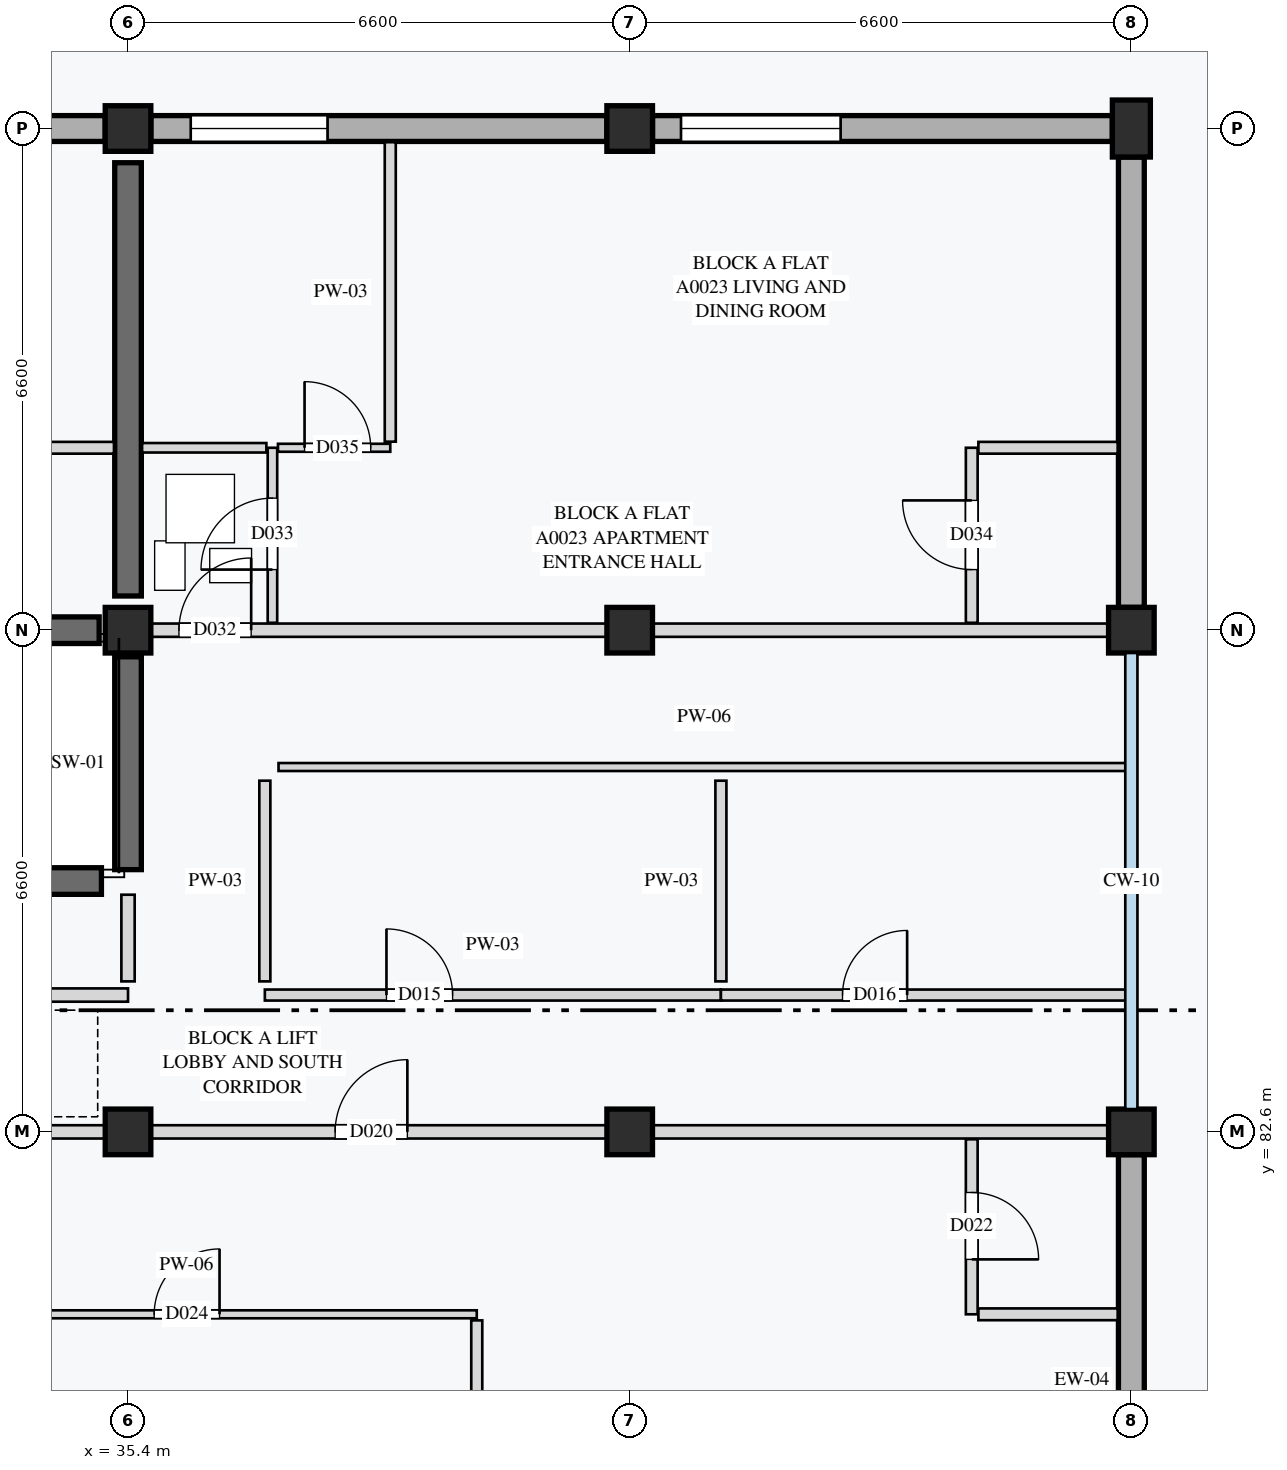
"""IFC4 building model, lengths in metres.
Left out: names, types, materials, properties, quantities, classifications, styles, units other than length and angle.
Written with IfcOpenShell. Run it as: python <this file> out.ifc"""

import sys

from ifc_helpers import new_model, si_unit, direction, frame, frame_2d, origin, origin_2d, place, context, subcontext, project, spatial, rectangle, extrude, element, fill, save


model = new_model("IFC4")
c1 = context("Model", 3, precision=1e-05, world=origin(), true_north=direction((0.0, 1.0)))
c2 = subcontext(c1, "Body", "Model", "MODEL_VIEW")
j1 = project(units=[si_unit("LENGTHUNIT", "METRE"), si_unit("PLANEANGLEUNIT", "RADIAN")], contexts=[c1])
p1 = place(None, origin())
s1 = spatial("IfcSite", under=j1, at=p1, CompositionType="ELEMENT")
p2 = place(p1, origin())
s2 = spatial("IfcBuilding", under=s1, at=p2, CompositionType="ELEMENT")
p3 = place(p2, origin())
s3 = spatial("IfcBuildingStorey", under=s2, at=p3, CompositionType="ELEMENT", Elevation=0.0)
for number, where, z_axis, x_axis in (
    (1, (35.4, 82.6, 0.0), (0.0, 0.0, 1.0), (1.0, 0.0, 0.0)),
    (2, (35.4, 89.2, 0.0), (0.0, 0.0, 1.0), (1.0, 0.0, 0.0)),
    (3, (35.4, 95.8, 0.0), (0.0, 0.0, 1.0), (1.0, 0.0, 0.0)),
    (4, (42.0, 82.6, 0.0), (0.0, 0.0, 1.0), (1.0, 0.0, 0.0)),
    (5, (42.0, 89.2, 0.0), (0.0, 0.0, 1.0), (1.0, 0.0, 0.0)),
    (6, (42.0, 95.8, 0.0), (0.0, 0.0, 1.0), (1.0, 0.0, 0.0)),
    (7, (48.6, 82.6, 0.0), (0.0, 0.0, 1.0), (1.0, 0.0, 0.0)),
    (8, (48.6, 89.2, 0.0), (0.0, 0.0, 1.0), (1.0, 0.0, 0.0)),
):
    element("IfcColumn", number, at=place(p3, frame(where, z_axis=z_axis, x_axis=x_axis)), inside=s3, PredefinedType="COLUMN", context=c2, shape_type="SweptSolid", body=[
        extrude(rectangle(XDim=0.6, YDim=0.6, at=origin_2d()), origin(), (0.0, 0.0, 1.0), 4.2),
    ])
p4 = place(p3, frame((48.6, 95.8, 0.0), z_axis=(0.0, 0.0, 1.0), x_axis=(1.0, 0.0, 0.0)))
e9 = element("IfcColumn", 9, at=p4, inside=s3, PredefinedType="COLUMN", context=c2, shape_type="SweptSolid", body=[
    extrude(rectangle(XDim=0.5, YDim=0.75, at=origin_2d()), origin(), (0.0, 0.0, 1.0), 4.2),
])
p5 = place(p3, frame((29.18, 89.2, 0.0), z_axis=(0.0, 0.0, 1.0), x_axis=(1.0, 0.0, 0.0)))
e10 = element("IfcWall", 10, at=p5, inside=s3, PredefinedType="SHEAR", context=c2, shape_type="SweptSolid", body=[
    extrude(rectangle(XDim=5.84, YDim=0.35, at=frame_2d((2.92, 0.0))), origin(), (0.0, 0.0, 1.0), 3.92),
])
for number, where, z_axis, x_axis in (
    (11, (32.25, 85.9, 0.0), (0.0, 0.0, 1.0), (1.0, 0.0, 0.0)),
    (12, (35.4, 86.05, 0.0), (0.0, 0.0, 1.0), (0.0, 1.0, 0.0)),
):
    element("IfcWall", number, at=place(p3, frame(where, z_axis=z_axis, x_axis=x_axis)), inside=s3, PredefinedType="SHEAR", context=c2, shape_type="SweptSolid", body=[
        extrude(rectangle(XDim=2.8, YDim=0.35, at=frame_2d((1.4, 0.0))), origin(), (0.0, 0.0, 1.0), 3.92),
    ])
p6 = place(p3, frame((35.4, 89.65, 0.0), z_axis=(0.0, 0.0, 1.0), x_axis=(0.0, 1.0, 0.0)))
e13 = element("IfcWall", 13, at=p6, inside=s3, PredefinedType="SHEAR", context=c2, shape_type="SweptSolid", body=[
    extrude(rectangle(XDim=5.7, YDim=0.35, at=frame_2d((2.85, 0.0))), origin(), (0.0, 0.0, 1.0), 3.92),
])
p7 = place(p3, frame((29.1, 95.8, 0.0), z_axis=(0.0, 0.0, 1.0), x_axis=(1.0, 0.0, 0.0)))
e14 = element("IfcWall", 14, at=p7, inside=s3, PredefinedType="STANDARD", context=c2, shape_type="SweptSolid", body=[
    extrude(rectangle(XDim=6.0, YDim=0.34, at=frame_2d((3.0, 0.0))), origin(), (0.0, 0.0, 1.0), 3.6),
])
p8 = place(p7, frame((2.396, 0.0, 0.85)))
e15 = element("IfcOpeningElement", 15, at=p8, cuts=e14, PredefinedType="OPENING", context=c2, shape_type="SweptSolid", body=[
    extrude(rectangle(XDim=2.1, YDim=1.55, at=frame_2d((1.05, 0.775))), frame((0.0, 0.18, 0.0), z_axis=(0.0, -1.0, 0.0), x_axis=(1.0, 0.0, 0.0)), (0.0, 0.0, 1.0), 0.36),
])
p9 = place(p3, frame((35.7, 95.8, 0.0), z_axis=(0.0, 0.0, 1.0), x_axis=(1.0, 0.0, 0.0)))
e16 = element("IfcWall", 16, at=p9, inside=s3, PredefinedType="STANDARD", context=c2, shape_type="SweptSolid", body=[
    extrude(rectangle(XDim=6.0, YDim=0.34, at=frame_2d((3.0, 0.0))), origin(), (0.0, 0.0, 1.0), 3.6),
])
p10 = place(p9, frame((0.525, 0.0, 0.85)))
e17 = element("IfcOpeningElement", 17, at=p10, cuts=e16, PredefinedType="OPENING", context=c2, shape_type="SweptSolid", body=[
    extrude(rectangle(XDim=1.8, YDim=1.35, at=frame_2d((0.9, 0.675))), frame((0.0, 0.18, 0.0), z_axis=(0.0, -1.0, 0.0), x_axis=(1.0, 0.0, 0.0)), (0.0, 0.0, 1.0), 0.36),
])
p11 = place(p3, frame((42.3, 95.8, 0.0), z_axis=(0.0, 0.0, 1.0), x_axis=(1.0, 0.0, 0.0)))
e18 = element("IfcWall", 18, at=p11, inside=s3, PredefinedType="STANDARD", context=c2, shape_type="SweptSolid", body=[
    extrude(rectangle(XDim=6.05, YDim=0.34, at=frame_2d((3.025, 0.0))), origin(), (0.0, 0.0, 1.0), 3.6),
])
p12 = place(p11, frame((0.375, 0.0, 0.85)))
e19 = element("IfcOpeningElement", 19, at=p12, cuts=e18, PredefinedType="OPENING", context=c2, shape_type="SweptSolid", body=[
    extrude(rectangle(XDim=2.1, YDim=1.55, at=frame_2d((1.05, 0.775))), frame((0.0, 0.18, 0.0), z_axis=(0.0, -1.0, 0.0), x_axis=(1.0, 0.0, 0.0)), (0.0, 0.0, 1.0), 0.36),
])
for number, where, z_axis, x_axis in (
    (20, (48.6, 76.375, 0.0), (0.0, 0.0, 1.0), (0.0, 1.0, 0.0)),
    (21, (48.6, 89.5, 0.0), (0.0, 0.0, 1.0), (0.0, 1.0, 0.0)),
):
    element("IfcWall", number, at=place(p3, frame(where, z_axis=z_axis, x_axis=x_axis)), inside=s3, PredefinedType="STANDARD", context=c2, shape_type="SweptSolid", body=[
        extrude(rectangle(XDim=5.925, YDim=0.34, at=frame_2d((2.962, 0.0))), origin(), (0.0, 0.0, 1.0), 3.65),
    ])
p13 = place(p3, frame((32.1, 84.4, 0.0), z_axis=(0.0, 0.0, 1.0), x_axis=(1.0, 0.0, 0.0)))
e22 = element("IfcWall", 22, at=p13, inside=s3, PredefinedType="PARTITIONING", context=c2, shape_type="SweptSolid", body=[
    extrude(rectangle(XDim=3.3, YDim=0.175, at=frame_2d((1.65, 0.0))), origin(), (0.0, 0.0, 1.0), 3.92),
])
p14 = place(p13, frame((1.1, 0.0, 0.0)))
e23 = element("IfcOpeningElement", 23, at=p14, cuts=e22, PredefinedType="OPENING", context=c2, shape_type="SweptSolid", body=[
    extrude(rectangle(XDim=0.85, YDim=2.0, at=frame_2d((0.425, 1.0))), frame((0.0, 0.097, 0.0), z_axis=(0.0, -1.0, 0.0), x_axis=(1.0, 0.0, 0.0)), (0.0, 0.0, 1.0), 0.195),
])
p15 = place(p3, frame((35.4, 84.58, 0.0), z_axis=(0.0, 0.0, 1.0), x_axis=(0.0, 1.0, 0.0)))
e24 = element("IfcWall", 24, at=p15, inside=s3, PredefinedType="PARTITIONING", context=c2, shape_type="SweptSolid", body=[
    extrude(rectangle(XDim=1.14, YDim=0.175, at=frame_2d((0.57, 0.0))), origin(), (0.0, 0.0, 1.0), 3.92),
])
p16 = place(p3, frame((37.2, 84.4, 0.0), z_axis=(0.0, 0.0, 1.0), x_axis=(1.0, 0.0, 0.0)))
e25 = element("IfcWall", 25, at=p16, inside=s3, PredefinedType="PARTITIONING", context=c2, shape_type="SweptSolid", body=[
    extrude(rectangle(XDim=6.0, YDim=0.145, at=frame_2d((3.0, 0.0))), origin(), (0.0, 0.0, 1.0), 3.92),
])
p17 = place(p16, frame((1.6, 0.0, 0.0)))
e26 = element("IfcOpeningElement", 26, at=p17, cuts=e25, PredefinedType="OPENING", context=c2, shape_type="SweptSolid", body=[
    extrude(rectangle(XDim=0.87, YDim=2.08, at=frame_2d((0.435, 1.04))), frame((0.0, 0.083, 0.0), z_axis=(0.0, -1.0, 0.0), x_axis=(1.0, 0.0, 0.0)), (0.0, 0.0, 1.0), 0.165),
])
p18 = place(p3, frame((43.2, 84.4, 0.0), z_axis=(0.0, 0.0, 1.0), x_axis=(1.0, 0.0, 0.0)))
e27 = element("IfcWall", 27, at=p18, inside=s3, PredefinedType="PARTITIONING", context=c2, shape_type="SweptSolid", body=[
    extrude(rectangle(XDim=5.4, YDim=0.145, at=frame_2d((2.7, 0.0))), origin(), (0.0, 0.0, 1.0), 3.92),
])
p19 = place(p18, frame((1.6, 0.0, 0.0)))
e28 = element("IfcOpeningElement", 28, at=p19, cuts=e27, PredefinedType="OPENING", context=c2, shape_type="SweptSolid", body=[
    extrude(rectangle(XDim=0.85, YDim=2.1, at=frame_2d((0.425, 1.05))), frame((0.0, 0.083, 0.0), z_axis=(0.0, -1.0, 0.0), x_axis=(1.0, 0.0, 0.0)), (0.0, 0.0, 1.0), 0.165),
])
p20 = place(p3, frame((43.2, 84.58, 0.0), z_axis=(0.0, 0.0, 1.0), x_axis=(0.0, 1.0, 0.0)))
e29 = element("IfcWall", 29, at=p20, inside=s3, PredefinedType="PARTITIONING", context=c2, shape_type="SweptSolid", body=[
    extrude(rectangle(XDim=2.64, YDim=0.145, at=frame_2d((1.32, 0.0))), origin(), (0.0, 0.0, 1.0), 3.92),
])
p21 = place(p3, frame((37.38, 87.4, 0.0), z_axis=(0.0, 0.0, 1.0), x_axis=(1.0, 0.0, 0.0)))
e30 = element("IfcWall", 30, at=p21, inside=s3, PredefinedType="PARTITIONING", context=c2, shape_type="SweptSolid", body=[
    extrude(rectangle(XDim=11.2, YDim=0.105, at=frame_2d((5.6, 0.0))), origin(), (0.0, 0.0, 1.0), 3.92),
])
p22 = place(p3, frame((37.2, 84.58, 0.0), z_axis=(0.0, 0.0, 1.0), x_axis=(0.0, 1.0, 0.0)))
e31 = element("IfcWall", 31, at=p22, inside=s3, PredefinedType="PARTITIONING", context=c2, shape_type="SweptSolid", body=[
    extrude(rectangle(XDim=2.64, YDim=0.145, at=frame_2d((1.32, 0.0))), origin(), (0.0, 0.0, 1.0), 3.92),
])
p23 = place(p3, frame((28.8, 82.6, 0.0), z_axis=(0.0, 0.0, 1.0), x_axis=(1.0, 0.0, 0.0)))
e32 = element("IfcWall", 32, at=p23, inside=s3, PredefinedType="PARTITIONING", context=c2, shape_type="SweptSolid", body=[
    extrude(rectangle(XDim=19.8, YDim=0.175, at=frame_2d((9.9, 0.0))), origin(), (0.0, 0.0, 1.0), 3.55),
])
p24 = place(p23, frame((9.325, 0.0, 0.0)))
e33 = element("IfcOpeningElement", 33, at=p24, cuts=e32, PredefinedType="OPENING", context=c2, shape_type="SweptSolid", body=[
    extrude(rectangle(XDim=0.95, YDim=2.1, at=frame_2d((0.475, 1.05))), frame((0.0, 0.097, 0.0), z_axis=(0.0, -1.0, 0.0), x_axis=(1.0, 0.0, 0.0)), (0.0, 0.0, 1.0), 0.195),
])
p25 = place(p3, frame((46.5, 82.502, 0.0), z_axis=(0.0, 0.0, 1.0), x_axis=(0.0, -1.0, 0.0)))
e34 = element("IfcWall", 34, at=p25, inside=s3, PredefinedType="PARTITIONING", context=c2, shape_type="SweptSolid", body=[
    extrude(rectangle(XDim=2.302, YDim=0.155, at=frame_2d((1.151, 0.0))), origin(), (0.0, 0.0, 1.0), 3.92),
])
p26 = place(p25, frame((0.7, 0.0, 0.0)))
e35 = element("IfcOpeningElement", 35, at=p26, cuts=e34, PredefinedType="OPENING", context=c2, shape_type="SweptSolid", body=[
    extrude(rectangle(XDim=0.88, YDim=2.1, at=frame_2d((0.44, 1.05))), frame((0.0, 0.087, 0.0), z_axis=(0.0, -1.0, 0.0), x_axis=(1.0, 0.0, 0.0)), (0.0, 0.0, 1.0), 0.175),
])
p27 = place(p3, frame((46.587, 80.2, 0.0), z_axis=(0.0, 0.0, 1.0), x_axis=(1.0, 0.0, 0.0)))
e36 = element("IfcWall", 36, at=p27, inside=s3, PredefinedType="PARTITIONING", context=c2, shape_type="SweptSolid", body=[
    extrude(rectangle(XDim=1.833, YDim=0.155, at=frame_2d((0.916, 0.0))), origin(), (0.0, 0.0, 1.0), 3.92),
])
p28 = place(p3, frame((32.35, 80.2, 0.0), z_axis=(0.0, 0.0, 1.0), x_axis=(1.0, 0.0, 0.0)))
e37 = element("IfcWall", 37, at=p28, inside=s3, PredefinedType="PARTITIONING", context=c2, shape_type="SweptSolid", body=[
    extrude(rectangle(XDim=7.638, YDim=0.105, at=frame_2d((3.819, 0.0))), origin(), (0.0, 0.0, 1.0), 3.92),
])
p29 = place(p28, frame((3.394, 0.0, 0.0)))
e38 = element("IfcOpeningElement", 38, at=p29, cuts=e37, PredefinedType="OPENING", context=c2, shape_type="SweptSolid", body=[
    extrude(rectangle(XDim=0.86, YDim=2.12, at=frame_2d((0.43, 1.06))), frame((0.0, 0.062, 0.0), z_axis=(0.0, -1.0, 0.0), x_axis=(1.0, 0.0, 0.0)), (0.0, 0.0, 1.0), 0.125),
])
p30 = place(p3, frame((39.988, 80.12, 0.0), z_axis=(0.0, 0.0, 1.0), x_axis=(0.0, -1.0, 0.0)))
e39 = element("IfcWall", 39, at=p30, inside=s3, PredefinedType="PARTITIONING", context=c2, shape_type="SweptSolid", body=[
    extrude(rectangle(XDim=3.94, YDim=0.145, at=frame_2d((1.97, 0.0))), origin(), (0.0, 0.0, 1.0), 3.92),
])
p31 = place(p3, frame((33.387, 91.6, 0.0), z_axis=(0.0, 0.0, 1.0), x_axis=(1.0, 0.0, 0.0)))
e40 = element("IfcWall", 40, at=p31, inside=s3, PredefinedType="PARTITIONING", context=c2, shape_type="SweptSolid", body=[
    extrude(rectangle(XDim=1.828, YDim=0.155, at=frame_2d((0.914, 0.0))), origin(), (0.0, 0.0, 1.0), 3.92),
])
p32 = place(p3, frame((35.4, 89.2, 0.0), z_axis=(0.0, 0.0, 1.0), x_axis=(1.0, 0.0, 0.0)))
e41 = element("IfcWall", 41, at=p32, inside=s3, PredefinedType="PARTITIONING", context=c2, shape_type="SweptSolid", body=[
    extrude(rectangle(XDim=13.2, YDim=0.175, at=frame_2d((6.6, 0.0))), origin(), (0.0, 0.0, 1.0), 3.55),
])
p33 = place(p32, frame((0.67, 0.0, 0.0)))
e42 = element("IfcOpeningElement", 42, at=p33, cuts=e41, PredefinedType="OPENING", context=c2, shape_type="SweptSolid", body=[
    extrude(rectangle(XDim=0.95, YDim=2.1, at=frame_2d((0.475, 1.05))), frame((0.0, 0.097, 0.0), z_axis=(0.0, -1.0, 0.0), x_axis=(1.0, 0.0, 0.0)), (0.0, 0.0, 1.0), 0.195),
])
p34 = place(p3, frame((37.3, 89.298, 0.0), z_axis=(0.0, 0.0, 1.0), x_axis=(0.0, 1.0, 0.0)))
e43 = element("IfcWall", 43, at=p34, inside=s3, PredefinedType="PARTITIONING", context=c2, shape_type="SweptSolid", body=[
    extrude(rectangle(XDim=2.302, YDim=0.125, at=frame_2d((1.151, 0.0))), origin(), (0.0, 0.0, 1.0), 3.92),
])
p35 = place(p34, frame((0.7, 0.0, 0.0)))
e44 = element("IfcOpeningElement", 44, at=p35, cuts=e43, PredefinedType="OPENING", context=c2, shape_type="SweptSolid", body=[
    extrude(rectangle(XDim=0.94, YDim=2.08, at=frame_2d((0.47, 1.04))), frame((0.0, 0.073, 0.0), z_axis=(0.0, -1.0, 0.0), x_axis=(1.0, 0.0, 0.0)), (0.0, 0.0, 1.0), 0.145),
])
p36 = place(p3, frame((35.585, 91.6, 0.0), z_axis=(0.0, 0.0, 1.0), x_axis=(1.0, 0.0, 0.0)))
e45 = element("IfcWall", 45, at=p36, inside=s3, PredefinedType="PARTITIONING", context=c2, shape_type="SweptSolid", body=[
    extrude(rectangle(XDim=1.635, YDim=0.125, at=frame_2d((0.817, 0.0))), origin(), (0.0, 0.0, 1.0), 3.92),
])
p37 = place(p3, frame((46.5, 89.298, 0.0), z_axis=(0.0, 0.0, 1.0), x_axis=(0.0, 1.0, 0.0)))
e46 = element("IfcWall", 46, at=p37, inside=s3, PredefinedType="PARTITIONING", context=c2, shape_type="SweptSolid", body=[
    extrude(rectangle(XDim=2.302, YDim=0.155, at=frame_2d((1.151, 0.0))), origin(), (0.0, 0.0, 1.0), 3.92),
])
p38 = place(p37, frame((0.7, 0.0, 0.0)))
e47 = element("IfcOpeningElement", 47, at=p38, cuts=e46, PredefinedType="OPENING", context=c2, shape_type="SweptSolid", body=[
    extrude(rectangle(XDim=0.91, YDim=2.14, at=frame_2d((0.455, 1.07))), frame((0.0, 0.087, 0.0), z_axis=(0.0, -1.0, 0.0), x_axis=(1.0, 0.0, 0.0)), (0.0, 0.0, 1.0), 0.175),
])
p39 = place(p3, frame((46.587, 91.6, 0.0), z_axis=(0.0, 0.0, 1.0), x_axis=(1.0, 0.0, 0.0)))
e48 = element("IfcWall", 48, at=p39, inside=s3, PredefinedType="PARTITIONING", context=c2, shape_type="SweptSolid", body=[
    extrude(rectangle(XDim=1.833, YDim=0.155, at=frame_2d((0.916, 0.0))), origin(), (0.0, 0.0, 1.0), 3.92),
])
p40 = place(p3, frame((37.373, 91.6, 0.0), z_axis=(0.0, 0.0, 1.0), x_axis=(1.0, 0.0, 0.0)))
e49 = element("IfcWall", 49, at=p40, inside=s3, PredefinedType="PARTITIONING", context=c2, shape_type="SweptSolid", body=[
    extrude(rectangle(XDim=1.478, YDim=0.105, at=frame_2d((0.739, 0.0))), origin(), (0.0, 0.0, 1.0), 3.92),
])
p41 = place(p40, frame((0.35, 0.0, 0.0)))
e50 = element("IfcOpeningElement", 50, at=p41, cuts=e49, PredefinedType="OPENING", context=c2, shape_type="SweptSolid", body=[
    extrude(rectangle(XDim=0.87, YDim=2.08, at=frame_2d((0.435, 1.04))), frame((0.0, 0.062, 0.0), z_axis=(0.0, -1.0, 0.0), x_axis=(1.0, 0.0, 0.0)), (0.0, 0.0, 1.0), 0.125),
])
p42 = place(p3, frame((38.85, 91.68, 0.0), z_axis=(0.0, 0.0, 1.0), x_axis=(0.0, 1.0, 0.0)))
e51 = element("IfcWall", 51, at=p42, inside=s3, PredefinedType="PARTITIONING", context=c2, shape_type="SweptSolid", body=[
    extrude(rectangle(XDim=3.94, YDim=0.145, at=frame_2d((1.97, 0.0))), origin(), (0.0, 0.0, 1.0), 3.92),
])
p43 = place(p10, origin())
e52 = element("IfcWindow", 52, at=p43, inside=s3, PartitioningType="SINGLE_PANEL", PredefinedType="WINDOW", context=c2, shape_type="SweptSolid", body=[
    extrude(rectangle(XDim=1.8, YDim=1.35, at=frame_2d((0.9, 0.675))), frame((0.0, 0.03, 0.0), z_axis=(0.0, -1.0, 0.0), x_axis=(1.0, 0.0, 0.0)), (0.0, 0.0, 1.0), 0.06),
])
fill(e17, e52)
p44 = place(p12, origin())
e53 = element("IfcWindow", 53, at=p44, inside=s3, PartitioningType="SINGLE_PANEL", PredefinedType="WINDOW", context=c2, shape_type="SweptSolid", body=[
    extrude(rectangle(XDim=2.1, YDim=1.55, at=frame_2d((1.05, 0.775))), frame((0.0, 0.03, 0.0), z_axis=(0.0, -1.0, 0.0), x_axis=(1.0, 0.0, 0.0)), (0.0, 0.0, 1.0), 0.06),
])
fill(e19, e53)
p45 = place(p17, origin())
e54 = element("IfcDoor", 54, at=p45, inside=s3, OperationType="SINGLE_SWING_LEFT", PredefinedType="DOOR", context=c2, shape_type="SweptSolid", body=[
    extrude(rectangle(XDim=0.87, YDim=2.08, at=frame_2d((0.435, 1.04))), frame((0.0, 0.025, 0.0), z_axis=(0.0, -1.0, 0.0), x_axis=(1.0, 0.0, 0.0)), (0.0, 0.0, 1.0), 0.05),
])
fill(e26, e54)
p46 = place(p19, origin())
e55 = element("IfcDoor", 55, at=p46, inside=s3, OperationType="SINGLE_SWING_RIGHT", PredefinedType="DOOR", context=c2, shape_type="SweptSolid", body=[
    extrude(rectangle(XDim=0.85, YDim=2.1, at=frame_2d((0.425, 1.05))), frame((0.0, 0.025, 0.0), z_axis=(0.0, -1.0, 0.0), x_axis=(1.0, 0.0, 0.0)), (0.0, 0.0, 1.0), 0.05),
])
fill(e28, e55)
p47 = place(p24, origin())
e56 = element("IfcDoor", 56, at=p47, inside=s3, OperationType="SINGLE_SWING_RIGHT", PredefinedType="DOOR", context=c2, shape_type="SweptSolid", body=[
    extrude(rectangle(XDim=0.95, YDim=2.1, at=frame_2d((0.475, 1.05))), frame((0.0, 0.025, 0.0), z_axis=(0.0, -1.0, 0.0), x_axis=(1.0, 0.0, 0.0)), (0.0, 0.0, 1.0), 0.05),
])
fill(e33, e56)
p48 = place(p26, origin())
e57 = element("IfcDoor", 57, at=p48, inside=s3, OperationType="SINGLE_SWING_RIGHT", PredefinedType="DOOR", context=c2, shape_type="SweptSolid", body=[
    extrude(rectangle(XDim=0.88, YDim=2.1, at=frame_2d((0.44, 1.05))), frame((0.0, 0.025, 0.0), z_axis=(0.0, -1.0, 0.0), x_axis=(1.0, 0.0, 0.0)), (0.0, 0.0, 1.0), 0.05),
])
fill(e35, e57)
p49 = place(p29, origin())
e58 = element("IfcDoor", 58, at=p49, inside=s3, OperationType="SINGLE_SWING_RIGHT", PredefinedType="DOOR", context=c2, shape_type="SweptSolid", body=[
    extrude(rectangle(XDim=0.86, YDim=2.12, at=frame_2d((0.43, 1.06))), frame((0.0, 0.025, 0.0), z_axis=(0.0, -1.0, 0.0), x_axis=(1.0, 0.0, 0.0)), (0.0, 0.0, 1.0), 0.05),
])
fill(e38, e58)
p50 = place(p33, origin())
e59 = element("IfcDoor", 59, at=p50, inside=s3, OperationType="SINGLE_SWING_RIGHT", PredefinedType="DOOR", context=c2, shape_type="SweptSolid", body=[
    extrude(rectangle(XDim=0.95, YDim=2.1, at=frame_2d((0.475, 1.05))), frame((0.0, 0.025, 0.0), z_axis=(0.0, -1.0, 0.0), x_axis=(1.0, 0.0, 0.0)), (0.0, 0.0, 1.0), 0.05),
])
fill(e42, e59)
p51 = place(p35, origin())
e60 = element("IfcDoor", 60, at=p51, inside=s3, OperationType="SINGLE_SWING_LEFT", PredefinedType="DOOR", context=c2, shape_type="SweptSolid", body=[
    extrude(rectangle(XDim=0.94, YDim=2.08, at=frame_2d((0.47, 1.04))), frame((0.0, 0.025, 0.0), z_axis=(0.0, -1.0, 0.0), x_axis=(1.0, 0.0, 0.0)), (0.0, 0.0, 1.0), 0.05),
])
fill(e44, e60)
p52 = place(p38, origin())
e61 = element("IfcDoor", 61, at=p52, inside=s3, OperationType="SINGLE_SWING_RIGHT", PredefinedType="DOOR", context=c2, shape_type="SweptSolid", body=[
    extrude(rectangle(XDim=0.91, YDim=2.14, at=frame_2d((0.455, 1.07))), frame((0.0, 0.025, 0.0), z_axis=(0.0, -1.0, 0.0), x_axis=(1.0, 0.0, 0.0)), (0.0, 0.0, 1.0), 0.05),
])
fill(e47, e61)
p53 = place(p41, origin())
e62 = element("IfcDoor", 62, at=p53, inside=s3, OperationType="SINGLE_SWING_LEFT", PredefinedType="DOOR", context=c2, shape_type="SweptSolid", body=[
    extrude(rectangle(XDim=0.87, YDim=2.08, at=frame_2d((0.435, 1.04))), frame((0.0, 0.025, 0.0), z_axis=(0.0, -1.0, 0.0), x_axis=(1.0, 0.0, 0.0)), (0.0, 0.0, 1.0), 0.05),
])
fill(e50, e62)
save(model, sys.argv[1])
